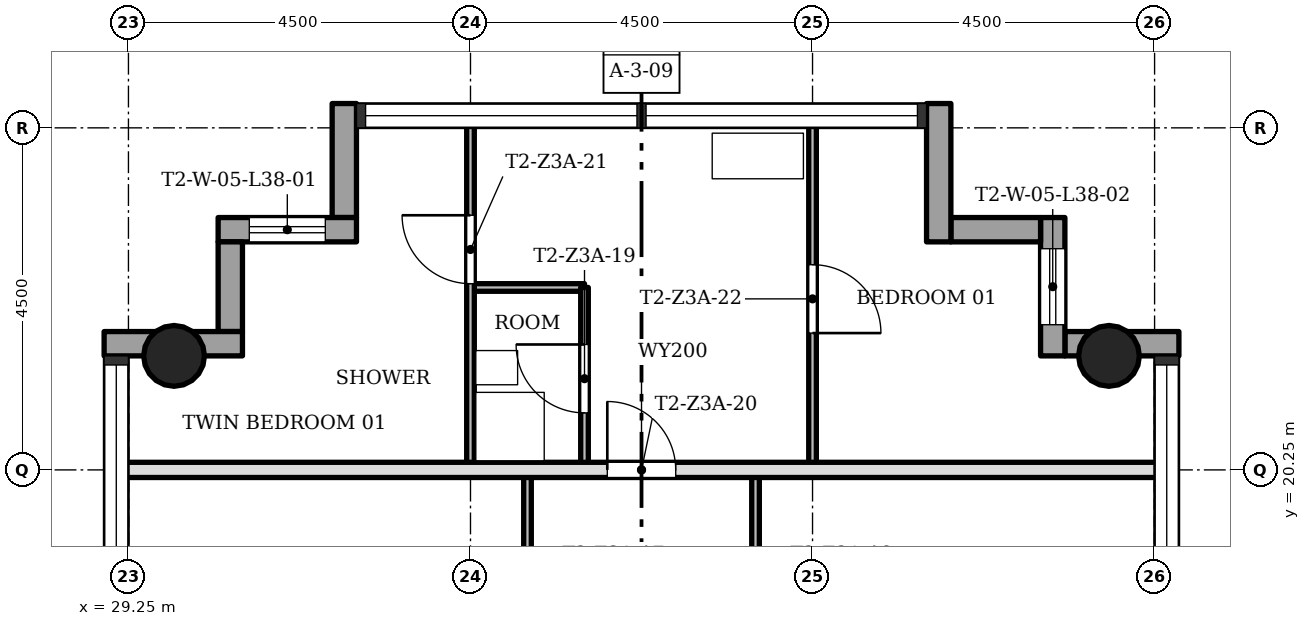
"""IFC4 building model, lengths in metres.
Left out: names, types, materials, properties, quantities, classifications, styles, units other than length and angle.
Written with IfcOpenShell. Run it as: python <this file> out.ifc"""

import sys

from ifc_helpers import new_model, si_unit, direction, frame, frame_2d, origin, origin_2d, place, context, subcontext, project, spatial, rectangle, hollow_circle, extrude, element, fill, save


model = new_model("IFC4")
c1 = context("Model", 3, precision=1e-05, world=origin(), true_north=direction((0.0, 1.0)))
c2 = subcontext(c1, "Body", "Model", "MODEL_VIEW")
j1 = project(units=[si_unit("LENGTHUNIT", "METRE"), si_unit("PLANEANGLEUNIT", "RADIAN")], contexts=[c1])
p1 = place(None, origin())
s1 = spatial("IfcSite", under=j1, at=p1, CompositionType="ELEMENT")
p2 = place(p1, origin())
s2 = spatial("IfcBuilding", under=s1, at=p2, CompositionType="ELEMENT")
p3 = place(p2, frame((0.0, 0.0, 140.5)))
s3 = spatial("IfcBuildingStorey", under=s2, at=p3, CompositionType="ELEMENT", Elevation=140.5)
for number, where, z_axis, x_axis in (
    (1, (42.15, 21.75, 0.0), (0.0, 0.0, 1.0), (1.0, 0.0, 0.0)),
    (2, (29.85, 21.75, 0.0), (0.0, 0.0, 1.0), (1.0, 0.0, 0.0)),
):
    element("IfcColumn", number, at=place(p3, frame(where, z_axis=z_axis, x_axis=x_axis)), inside=s3, PredefinedType="COLUMN", context=c2, shape_type="SweptSolid", body=[
        extrude(hollow_circle(Radius=0.4, WallThickness=0.028, at=origin_2d()), origin(), (0.0, 0.0, 1.0), 3.4),
    ])
p4 = place(p3, frame((43.07, 21.91, -0.3), z_axis=(0.0, 0.0, 1.0), x_axis=(-1.0, 0.0, 0.0)))
e3 = element("IfcWall", 3, at=p4, inside=s3, PredefinedType="STANDARD", context=c2, shape_type="SweptSolid", body=[
    extrude(rectangle(XDim=1.5, YDim=0.32, at=frame_2d((0.75, 0.0))), origin(), (0.0, 0.0, 1.0), 3.4),
])
p5 = place(p3, frame((41.41, 21.75, -0.3), z_axis=(0.0, 0.0, 1.0), x_axis=(0.0, 1.0, 0.0)))
e4 = element("IfcWall", 4, at=p5, inside=s3, PredefinedType="STANDARD", context=c2, shape_type="SweptSolid", body=[
    extrude(rectangle(XDim=1.82, YDim=0.32, at=frame_2d((0.91, 0.0))), origin(), (0.0, 0.0, 1.0), 3.4),
])
p6 = place(p5, frame((0.41, 0.0, 1.2)))
e5 = element("IfcOpeningElement", 5, at=p6, cuts=e4, PredefinedType="OPENING", context=c2, shape_type="SweptSolid", body=[
    extrude(rectangle(XDim=1.0, YDim=1.5, at=frame_2d((0.5, 0.75))), frame((0.0, 0.17, 0.0), z_axis=(0.0, -1.0, 0.0), x_axis=(1.0, 0.0, 0.0)), (0.0, 0.0, 1.0), 0.34),
])
p7 = place(p3, frame((41.25, 23.41, -0.3), z_axis=(0.0, 0.0, 1.0), x_axis=(-1.0, 0.0, 0.0)))
e6 = element("IfcWall", 6, at=p7, inside=s3, PredefinedType="STANDARD", context=c2, shape_type="SweptSolid", body=[
    extrude(rectangle(XDim=1.18, YDim=0.32, at=frame_2d((0.59, 0.0))), origin(), (0.0, 0.0, 1.0), 3.4),
])
p8 = place(p3, frame((39.91, 23.25, -0.3), z_axis=(0.0, 0.0, 1.0), x_axis=(0.0, 1.0, 0.0)))
e7 = element("IfcWall", 7, at=p8, inside=s3, PredefinedType="STANDARD", context=c2, shape_type="SweptSolid", body=[
    extrude(rectangle(XDim=1.82, YDim=0.32, at=frame_2d((0.91, 0.0))), origin(), (0.0, 0.0, 1.0), 3.4),
])
p9 = place(p3, frame((32.09, 25.07, -0.3), z_axis=(0.0, 0.0, 1.0), x_axis=(0.0, -1.0, 0.0)))
e8 = element("IfcWall", 8, at=p9, inside=s3, PredefinedType="STANDARD", context=c2, shape_type="SweptSolid", body=[
    extrude(rectangle(XDim=1.5, YDim=0.32, at=frame_2d((0.75, 0.0))), origin(), (0.0, 0.0, 1.0), 3.4),
])
p10 = place(p3, frame((32.25, 23.41, -0.3), z_axis=(0.0, 0.0, 1.0), x_axis=(-1.0, 0.0, 0.0)))
e9 = element("IfcWall", 9, at=p10, inside=s3, PredefinedType="STANDARD", context=c2, shape_type="SweptSolid", body=[
    extrude(rectangle(XDim=1.82, YDim=0.32, at=frame_2d((0.91, 0.0))), origin(), (0.0, 0.0, 1.0), 3.4),
])
p11 = place(p10, frame((0.41, 0.0, 1.2)))
e10 = element("IfcOpeningElement", 10, at=p11, cuts=e9, PredefinedType="OPENING", context=c2, shape_type="SweptSolid", body=[
    extrude(rectangle(XDim=1.0, YDim=1.5, at=frame_2d((0.5, 0.75))), frame((0.0, 0.17, 0.0), z_axis=(0.0, -1.0, 0.0), x_axis=(1.0, 0.0, 0.0)), (0.0, 0.0, 1.0), 0.34),
])
p12 = place(p3, frame((30.59, 23.25, -0.3), z_axis=(0.0, 0.0, 1.0), x_axis=(0.0, -1.0, 0.0)))
e11 = element("IfcWall", 11, at=p12, inside=s3, PredefinedType="STANDARD", context=c2, shape_type="SweptSolid", body=[
    extrude(rectangle(XDim=1.18, YDim=0.32, at=frame_2d((0.59, 0.0))), origin(), (0.0, 0.0, 1.0), 3.4),
])
p13 = place(p3, frame((30.75, 21.91, -0.3), z_axis=(0.0, 0.0, 1.0), x_axis=(-1.0, 0.0, 0.0)))
e12 = element("IfcWall", 12, at=p13, inside=s3, PredefinedType="STANDARD", context=c2, shape_type="SweptSolid", body=[
    extrude(rectangle(XDim=1.82, YDim=0.32, at=frame_2d((0.91, 0.0))), origin(), (0.0, 0.0, 1.0), 3.4),
])
p14 = place(p3, frame((42.85, 20.25, 0.0), z_axis=(0.0, 0.0, 1.0), x_axis=(-1.0, 0.0, 0.0)))
e13 = element("IfcWall", 13, at=p14, inside=s3, PredefinedType="SOLIDWALL", context=c2, shape_type="SweptSolid", body=[
    extrude(rectangle(XDim=13.7, YDim=0.2, at=frame_2d((6.85, 0.0))), origin(), (0.0, 0.0, 1.0), 3.0),
])
p15 = place(p14, frame((6.4, 0.0, 0.0)))
e14 = element("IfcOpeningElement", 14, at=p15, cuts=e13, PredefinedType="OPENING", context=c2, shape_type="SweptSolid", body=[
    extrude(rectangle(XDim=0.9, YDim=2.1, at=frame_2d((0.45, 1.05))), frame((0.0, 0.11, 0.0), z_axis=(0.0, -1.0, 0.0), x_axis=(1.0, 0.0, 0.0)), (0.0, 0.0, 1.0), 0.22),
])
p16 = place(p3, frame((35.25, 22.65, 0.0), z_axis=(0.0, 0.0, 1.0), x_axis=(-1.0, 0.0, 0.0)))
e15 = element("IfcWall", 15, at=p16, inside=s3, PredefinedType="PARTITIONING", context=c2, shape_type="SweptSolid", body=[
    extrude(rectangle(XDim=1.5, YDim=0.1, at=frame_2d((0.75, 0.0))), origin(), (0.0, 0.0, 1.0), 3.0),
])
p17 = place(p3, frame((38.25, 20.25, 0.0), z_axis=(0.0, 0.0, 1.0), x_axis=(0.0, 1.0, 0.0)))
e16 = element("IfcWall", 16, at=p17, inside=s3, PredefinedType="PARTITIONING", context=c2, shape_type="SweptSolid", body=[
    extrude(rectangle(XDim=4.6, YDim=0.1, at=frame_2d((2.3, 0.0))), origin(), (0.0, 0.0, 1.0), 3.0),
])
p18 = place(p17, frame((1.8, 0.0, 0.0)))
e17 = element("IfcOpeningElement", 17, at=p18, cuts=e16, PredefinedType="OPENING", context=c2, shape_type="SweptSolid", body=[
    extrude(rectangle(XDim=0.9, YDim=2.1, at=frame_2d((0.45, 1.05))), frame((0.0, 0.06, 0.0), z_axis=(0.0, -1.0, 0.0), x_axis=(1.0, 0.0, 0.0)), (0.0, 0.0, 1.0), 0.12),
])
p19 = place(p3, frame((37.5, 15.75, 0.0), z_axis=(0.0, 0.0, 1.0), x_axis=(0.0, 1.0, 0.0)))
e18 = element("IfcWall", 18, at=p19, inside=s3, PredefinedType="PARTITIONING", context=c2, shape_type="SweptSolid", body=[
    extrude(rectangle(XDim=4.5, YDim=0.1, at=frame_2d((2.25, 0.0))), origin(), (0.0, 0.0, 1.0), 3.0),
])
p20 = place(p19, frame((1.8, 0.0, 0.0)))
e19 = element("IfcOpeningElement", 19, at=p20, cuts=e18, PredefinedType="OPENING", context=c2, shape_type="SweptSolid", body=[
    extrude(rectangle(XDim=0.9, YDim=2.1, at=frame_2d((0.45, 1.05))), frame((0.0, 0.06, 0.0), z_axis=(0.0, -1.0, 0.0), x_axis=(1.0, 0.0, 0.0)), (0.0, 0.0, 1.0), 0.12),
])
p21 = place(p3, frame((35.25, 20.25, 0.0), z_axis=(0.0, 0.0, 1.0), x_axis=(0.0, 1.0, 0.0)))
e20 = element("IfcWall", 20, at=p21, inside=s3, PredefinedType="PARTITIONING", context=c2, shape_type="SweptSolid", body=[
    extrude(rectangle(XDim=2.4, YDim=0.1, at=frame_2d((1.2, 0.0))), origin(), (0.0, 0.0, 1.0), 3.0),
])
p22 = place(p21, frame((0.75, 0.0, 0.0)))
e21 = element("IfcOpeningElement", 21, at=p22, cuts=e20, PredefinedType="OPENING", context=c2, shape_type="SweptSolid", body=[
    extrude(rectangle(XDim=0.9, YDim=2.1, at=frame_2d((0.45, 1.05))), frame((0.0, 0.06, 0.0), z_axis=(0.0, -1.0, 0.0), x_axis=(1.0, 0.0, 0.0)), (0.0, 0.0, 1.0), 0.12),
])
p23 = place(p3, frame((34.5, 15.75, 0.0), z_axis=(0.0, 0.0, 1.0), x_axis=(0.0, 1.0, 0.0)))
e22 = element("IfcWall", 22, at=p23, inside=s3, PredefinedType="PARTITIONING", context=c2, shape_type="SweptSolid", body=[
    extrude(rectangle(XDim=4.5, YDim=0.1, at=frame_2d((2.25, 0.0))), origin(), (0.0, 0.0, 1.0), 3.0),
])
p24 = place(p23, frame((1.8, 0.0, 0.0)))
e23 = element("IfcOpeningElement", 23, at=p24, cuts=e22, PredefinedType="OPENING", context=c2, shape_type="SweptSolid", body=[
    extrude(rectangle(XDim=0.9, YDim=2.1, at=frame_2d((0.45, 1.05))), frame((0.0, 0.06, 0.0), z_axis=(0.0, -1.0, 0.0), x_axis=(1.0, 0.0, 0.0)), (0.0, 0.0, 1.0), 0.12),
])
p25 = place(p3, frame((33.75, 20.25, 0.0), z_axis=(0.0, 0.0, 1.0), x_axis=(0.0, 1.0, 0.0)))
e24 = element("IfcWall", 24, at=p25, inside=s3, PredefinedType="PARTITIONING", context=c2, shape_type="SweptSolid", body=[
    extrude(rectangle(XDim=4.6, YDim=0.1, at=frame_2d((2.3, 0.0))), origin(), (0.0, 0.0, 1.0), 3.0),
])
p26 = place(p25, frame((2.45, 0.0, 0.0)))
e25 = element("IfcOpeningElement", 25, at=p26, cuts=e24, PredefinedType="OPENING", context=c2, shape_type="SweptSolid", body=[
    extrude(rectangle(XDim=0.9, YDim=2.1, at=frame_2d((0.45, 1.05))), frame((0.0, 0.06, 0.0), z_axis=(0.0, -1.0, 0.0), x_axis=(1.0, 0.0, 0.0)), (0.0, 0.0, 1.0), 0.12),
])
p27 = place(p22, origin())
e26 = element("IfcDoor", 26, at=p27, inside=s3, OperationType="SINGLE_SWING_LEFT", PredefinedType="DOOR", context=c2, shape_type="SweptSolid", body=[
    extrude(rectangle(XDim=0.9, YDim=2.1, at=frame_2d((0.45, 1.05))), frame((0.0, 0.025, 0.0), z_axis=(0.0, -1.0, 0.0), x_axis=(1.0, 0.0, 0.0)), (0.0, 0.0, 1.0), 0.05),
])
fill(e21, e26)
p28 = place(p15, origin())
e27 = element("IfcDoor", 27, at=p28, inside=s3, OperationType="SINGLE_SWING_RIGHT", PredefinedType="DOOR", context=c2, shape_type="SweptSolid", body=[
    extrude(rectangle(XDim=0.9, YDim=2.1, at=frame_2d((0.45, 1.05))), frame((0.0, 0.025, 0.0), z_axis=(0.0, -1.0, 0.0), x_axis=(1.0, 0.0, 0.0)), (0.0, 0.0, 1.0), 0.05),
])
fill(e14, e27)
p29 = place(p26, origin())
e28 = element("IfcDoor", 28, at=p29, inside=s3, OperationType="SINGLE_SWING_LEFT", PredefinedType="DOOR", context=c2, shape_type="SweptSolid", body=[
    extrude(rectangle(XDim=0.9, YDim=2.1, at=frame_2d((0.45, 1.05))), frame((0.0, 0.025, 0.0), z_axis=(0.0, -1.0, 0.0), x_axis=(1.0, 0.0, 0.0)), (0.0, 0.0, 1.0), 0.05),
])
fill(e25, e28)
p30 = place(p18, origin())
e29 = element("IfcDoor", 29, at=p30, inside=s3, OperationType="SINGLE_SWING_LEFT", PredefinedType="DOOR", context=c2, shape_type="SweptSolid", body=[
    extrude(rectangle(XDim=0.9, YDim=2.1, at=frame_2d((0.45, 1.05))), frame((0.0, 0.025, 0.0), z_axis=(0.0, -1.0, 0.0), x_axis=(1.0, 0.0, 0.0)), (0.0, 0.0, 1.0), 0.05),
])
fill(e17, e29)
p31 = place(p11, origin())
e30 = element("IfcWindow", 30, at=p31, inside=s3, PartitioningType="SINGLE_PANEL", PredefinedType="WINDOW", context=c2, shape_type="SweptSolid", body=[
    extrude(rectangle(XDim=1.0, YDim=1.5, at=frame_2d((0.5, 0.75))), frame((0.0, 0.03, 0.0), z_axis=(0.0, -1.0, 0.0), x_axis=(1.0, 0.0, 0.0)), (0.0, 0.0, 1.0), 0.06),
])
fill(e10, e30)
p32 = place(p6, origin())
e31 = element("IfcWindow", 31, at=p32, inside=s3, PartitioningType="SINGLE_PANEL", PredefinedType="WINDOW", context=c2, shape_type="SweptSolid", body=[
    extrude(rectangle(XDim=1.0, YDim=1.5, at=frame_2d((0.5, 0.75))), frame((0.0, 0.03, 0.0), z_axis=(0.0, -1.0, 0.0), x_axis=(1.0, 0.0, 0.0)), (0.0, 0.0, 1.0), 0.06),
])
fill(e5, e31)
save(model, sys.argv[1])
